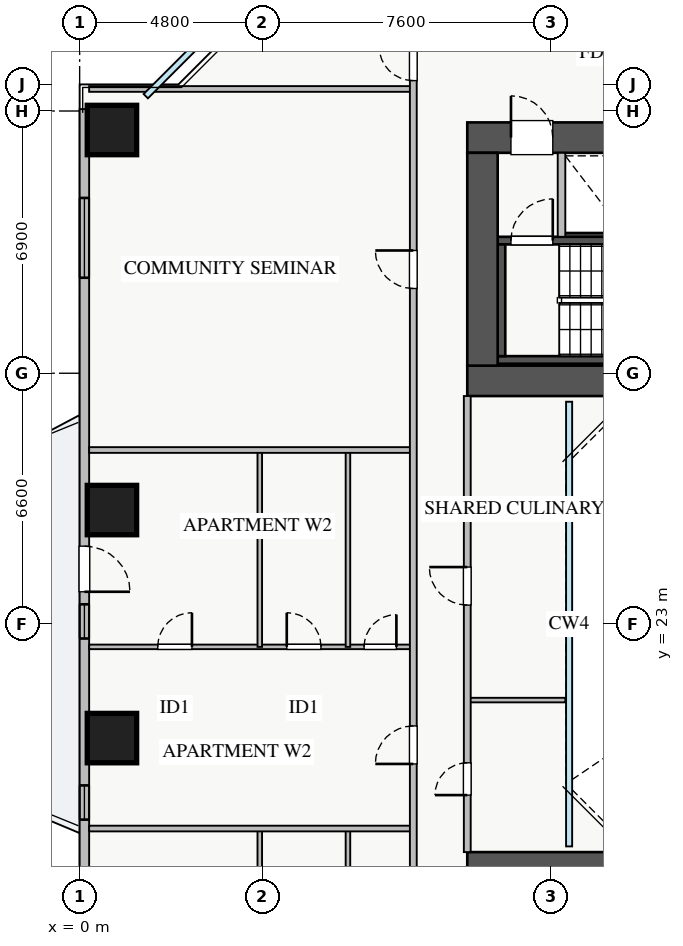
"""IFC4 building model, lengths in metres.
Left out: names, types, materials, properties, quantities, classifications, styles, units other than length and angle.
Written with IfcOpenShell. Run it as: python <this file> out.ifc"""

import sys

from ifc_helpers import new_model, si_unit, direction, frame, frame_2d, origin, origin_2d, place, context, subcontext, project, spatial, rectangle, extrude, source, transform, mapped, element, fill, save


model = new_model("IFC4")
c1 = context("Model", 3, precision=1e-05, world=origin(), true_north=direction((0.0, 1.0)))
c2 = subcontext(c1, "Body", "Model", "MODEL_VIEW")
j1 = project(units=[si_unit("LENGTHUNIT", "METRE"), si_unit("PLANEANGLEUNIT", "RADIAN")], contexts=[c1])
p1 = place(None, origin())
s1 = spatial("IfcSite", under=j1, at=p1, CompositionType="ELEMENT")
p2 = place(p1, origin())
s2 = spatial("IfcBuilding", under=s1, at=p2, CompositionType="ELEMENT")
p3 = place(p2, frame((0.0, 0.0, 76.25)))
s3 = spatial("IfcBuildingStorey", under=s2, at=p3, CompositionType="ELEMENT", Elevation=76.25)
p4 = place(p3, frame((12.68, 33.2, 0.0), z_axis=(0.0, 0.0, 1.0), x_axis=(1.0, 0.0, 0.0)))
e1 = element("IfcWall", 1, at=p4, inside=s3, PredefinedType="SHEAR", context=c2, shape_type="SweptSolid", body=[
    extrude(rectangle(XDim=1.94, YDim=0.18, at=frame_2d((0.97, 0.0))), origin(), (0.0, 0.0, 1.0), 3.07),
])
p5 = place(p3, frame((11.0, 29.95, 0.0), z_axis=(0.0, 0.0, 1.0), x_axis=(1.0, 0.0, 0.0)))
e2 = element("IfcWall", 2, at=p5, inside=s3, PredefinedType="SHEAR", context=c2, shape_type="SweptSolid", body=[
    extrude(rectangle(XDim=7.15, YDim=0.2, at=frame_2d((3.575, 0.0))), origin(), (0.0, 0.0, 1.0), 3.25),
])
p6 = place(p3, frame((11.0, 33.09, 0.0), z_axis=(0.0, 0.0, 1.0), x_axis=(1.0, 0.0, 0.0)))
e3 = element("IfcWall", 3, at=p6, inside=s3, PredefinedType="SHEAR", context=c2, shape_type="SweptSolid", body=[
    extrude(rectangle(XDim=7.15, YDim=0.2, at=frame_2d((3.575, 0.0))), origin(), (0.0, 0.0, 1.0), 3.25),
])
p7 = place(p6, frame((0.35, 0.0, 0.0)))
e4 = element("IfcOpeningElement", 4, at=p7, cuts=e3, PredefinedType="OPENING", context=c2, shape_type="SweptSolid", body=[
    extrude(rectangle(XDim=1.1, YDim=2.05, at=frame_2d((0.55, 1.025))), frame((0.0, 0.11, 0.0), z_axis=(0.0, -1.0, 0.0), x_axis=(1.0, 0.0, 0.0)), (0.0, 0.0, 1.0), 0.22),
])
p8 = place(p3, frame((11.1, 30.05, 0.0), z_axis=(0.0, 0.0, 1.0), x_axis=(0.0, 1.0, 0.0)))
e5 = element("IfcWall", 5, at=p8, inside=s3, PredefinedType="SHEAR", context=c2, shape_type="SweptSolid", body=[
    extrude(rectangle(XDim=2.94, YDim=0.2, at=frame_2d((1.47, 0.0))), origin(), (0.0, 0.0, 1.0), 3.25),
])
p9 = place(p3, frame((10.2, 29.4, 0.0), z_axis=(0.0, 0.0, 1.0), x_axis=(1.0, 0.0, 0.0)))
e6 = element("IfcWall", 6, at=p9, inside=s3, PredefinedType="SHEAR", context=c2, shape_type="SweptSolid", body=[
    extrude(rectangle(XDim=17.6, YDim=0.8, at=frame_2d((8.8, 0.0))), origin(), (0.0, 0.0, 1.0), 3.25),
])
p10 = place(p3, frame((10.2, 35.8, 0.0), z_axis=(0.0, 0.0, 1.0), x_axis=(1.0, 0.0, 0.0)))
e7 = element("IfcWall", 7, at=p10, inside=s3, PredefinedType="SHEAR", context=c2, shape_type="SweptSolid", body=[
    extrude(rectangle(XDim=17.6, YDim=0.8, at=frame_2d((8.8, 0.0))), origin(), (0.0, 0.0, 1.0), 3.25),
])
p11 = place(p10, frame((1.15, 0.0, 0.0)))
e8 = element("IfcOpeningElement", 8, at=p11, cuts=e7, PredefinedType="OPENING", context=c2, shape_type="SweptSolid", body=[
    extrude(rectangle(XDim=1.1, YDim=2.05, at=frame_2d((0.55, 1.025))), frame((0.0, 0.41, 0.0), z_axis=(0.0, -1.0, 0.0), x_axis=(1.0, 0.0, 0.0)), (0.0, 0.0, 1.0), 0.82),
])
p12 = place(p10, frame((8.3, 0.0, 0.0)))
e9 = element("IfcOpeningElement", 9, at=p12, cuts=e7, PredefinedType="OPENING", context=c2, shape_type="SweptSolid", body=[
    extrude(rectangle(XDim=1.1, YDim=2.05, at=frame_2d((0.55, 1.025))), frame((0.0, 0.41, 0.0), z_axis=(0.0, -1.0, 0.0), x_axis=(1.0, 0.0, 0.0)), (0.0, 0.0, 1.0), 0.82),
])
p13 = place(p10, frame((10.05, 0.0, 0.0)))
e10 = element("IfcOpeningElement", 10, at=p13, cuts=e7, PredefinedType="OPENING", context=c2, shape_type="SweptSolid", body=[
    extrude(rectangle(XDim=1.1, YDim=2.05, at=frame_2d((0.55, 1.025))), frame((0.0, 0.41, 0.0), z_axis=(0.0, -1.0, 0.0), x_axis=(1.0, 0.0, 0.0)), (0.0, 0.0, 1.0), 0.82),
])
p14 = place(p10, frame((14.74, 0.0, 0.0)))
e11 = element("IfcOpeningElement", 11, at=p14, cuts=e7, PredefinedType="OPENING", context=c2, shape_type="SweptSolid", body=[
    extrude(rectangle(XDim=1.0, YDim=2.05, at=frame_2d((0.5, 1.025))), frame((0.0, 0.41, 0.0), z_axis=(0.0, -1.0, 0.0), x_axis=(1.0, 0.0, 0.0)), (0.0, 0.0, 1.0), 0.82),
])
p15 = place(p10, frame((12.585, 0.0, 0.0)))
e12 = element("IfcOpeningElement", 12, at=p15, cuts=e7, PredefinedType="OPENING", context=c2, shape_type="SweptSolid", body=[
    extrude(rectangle(XDim=1.0, YDim=2.05, at=frame_2d((0.5, 1.025))), frame((0.0, 0.41, 0.0), z_axis=(0.0, -1.0, 0.0), x_axis=(1.0, 0.0, 0.0)), (0.0, 0.0, 1.0), 0.82),
])
p16 = place(p3, frame((10.6, 29.8, 0.0), z_axis=(0.0, 0.0, 1.0), x_axis=(0.0, 1.0, 0.0)))
e13 = element("IfcWall", 13, at=p16, inside=s3, PredefinedType="SHEAR", context=c2, shape_type="SweptSolid", body=[
    extrude(rectangle(XDim=5.6, YDim=0.8, at=frame_2d((2.8, 0.0))), origin(), (0.0, 0.0, 1.0), 3.25),
])
p17 = place(p3, frame((10.2, 16.6, 0.0), z_axis=(0.0, 0.0, 1.0), x_axis=(1.0, 0.0, 0.0)))
e14 = element("IfcWall", 14, at=p17, inside=s3, PredefinedType="SHEAR", context=c2, shape_type="SweptSolid", body=[
    extrude(rectangle(XDim=17.6, YDim=0.8, at=frame_2d((8.8, 0.0))), origin(), (0.0, 0.0, 1.0), 3.25),
])
m1 = source(origin(), c2, "Body", "SweptSolid", [
    extrude(rectangle(XDim=1.3, YDim=1.3, at=origin_2d()), origin(), (0.0, 0.0, 1.0), 3.25),
])
for number, where, z_axis, x_axis in (
    (15, (0.85, 36.0, 0.0), (0.0, 0.0, 1.0), (1.0, 0.0, 0.0)),
    (16, (0.85, 26.0, 0.0), (0.0, 0.0, 1.0), (1.0, 0.0, 0.0)),
    (17, (0.85, 20.0, 0.0), (0.0, 0.0, 1.0), (1.0, 0.0, 0.0)),
):
    element("IfcColumn", number, at=place(p3, frame(where, z_axis=z_axis, x_axis=x_axis)), inside=s3, PredefinedType="COLUMN", context=c2, shape_type="MappedRepresentation", body=[
        mapped(m1, transform((0.0, 0.0, 0.0), x_axis=(1.0, 0.0, 0.0), y_axis=(0.0, 1.0, 0.0), z_axis=(0.0, 0.0, 1.0), scale=1.0)),
    ])
p18 = place(p3, frame((0.125, 9.45, 0.0), z_axis=(0.0, 0.0, 1.0), x_axis=(0.0, 1.0, 0.0)))
e18 = element("IfcWall", 18, at=p18, inside=s3, PredefinedType="STANDARD", context=c2, shape_type="SweptSolid", body=[
    extrude(rectangle(XDim=27.1, YDim=0.25, at=frame_2d((13.55, 0.0))), origin(), (0.0, 0.0, 1.0), 2.61),
])
p19 = place(p18, frame((14.4, 0.0, 0.0)))
e19 = element("IfcOpeningElement", 19, at=p19, cuts=e18, PredefinedType="OPENING", context=c2, shape_type="SweptSolid", body=[
    extrude(rectangle(XDim=1.2, YDim=2.1, at=frame_2d((0.6, 1.05))), frame((0.0, 0.135, 0.0), z_axis=(0.0, -1.0, 0.0), x_axis=(1.0, 0.0, 0.0)), (0.0, 0.0, 1.0), 0.27),
])
p20 = place(p18, frame((1.403, 0.0, 0.9)))
e20 = element("IfcOpeningElement", 20, at=p20, cuts=e18, PredefinedType="OPENING", context=c2, shape_type="SweptSolid", body=[
    extrude(rectangle(XDim=1.8, YDim=1.5, at=frame_2d((0.9, 0.75))), frame((0.0, 0.135, 0.0), z_axis=(0.0, -1.0, 0.0), x_axis=(1.0, 0.0, 0.0)), (0.0, 0.0, 1.0), 0.27),
])
p21 = place(p18, frame((22.663, 0.0, 0.9)))
e21 = element("IfcOpeningElement", 21, at=p21, cuts=e18, PredefinedType="OPENING", context=c2, shape_type="SweptSolid", body=[
    extrude(rectangle(XDim=2.1, YDim=1.48, at=frame_2d((1.05, 0.74))), frame((0.0, 0.135, 0.0), z_axis=(0.0, -1.0, 0.0), x_axis=(1.0, 0.0, 0.0)), (0.0, 0.0, 1.0), 0.27),
])
p22 = place(p18, frame((4.607, 0.0, 0.9)))
e22 = element("IfcOpeningElement", 22, at=p22, cuts=e18, PredefinedType="OPENING", context=c2, shape_type="SweptSolid", body=[
    extrude(rectangle(XDim=2.4, YDim=1.5, at=frame_2d((1.2, 0.75))), frame((0.0, 0.135, 0.0), z_axis=(0.0, -1.0, 0.0), x_axis=(1.0, 0.0, 0.0)), (0.0, 0.0, 1.0), 0.27),
])
p23 = place(p18, frame((13.17, 0.0, 0.9)))
e23 = element("IfcOpeningElement", 23, at=p23, cuts=e18, PredefinedType="OPENING", context=c2, shape_type="SweptSolid", body=[
    extrude(rectangle(XDim=0.9, YDim=1.2, at=frame_2d((0.45, 0.6))), frame((0.0, 0.135, 0.0), z_axis=(0.0, -1.0, 0.0), x_axis=(1.0, 0.0, 0.0)), (0.0, 0.0, 1.0), 0.27),
])
p24 = place(p18, frame((8.405, 0.0, 0.9)))
e24 = element("IfcOpeningElement", 24, at=p24, cuts=e18, PredefinedType="OPENING", context=c2, shape_type="SweptSolid", body=[
    extrude(rectangle(XDim=0.9, YDim=1.2, at=frame_2d((0.45, 0.6))), frame((0.0, 0.135, 0.0), z_axis=(0.0, -1.0, 0.0), x_axis=(1.0, 0.0, 0.0)), (0.0, 0.0, 1.0), 0.27),
])
p25 = place(p3, frame((12.68, 33.19, 0.0), z_axis=(0.0, 0.0, 1.0), x_axis=(0.0, 1.0, 0.0)))
e25 = element("IfcWall", 25, at=p25, inside=s3, PredefinedType="PARTITIONING", context=c2, shape_type="SweptSolid", body=[
    extrude(rectangle(XDim=2.21, YDim=0.2, at=frame_2d((1.105, 0.0))), origin(), (0.0, 0.0, 1.0), 3.07),
])
p26 = place(p3, frame((0.25, 37.08, 0.0), z_axis=(0.0, 0.0, 1.0), x_axis=(1.0, 0.0, 0.0)))
e26 = element("IfcWall", 26, at=p26, inside=s3, PredefinedType="PARTITIONING", context=c2, shape_type="SweptSolid", body=[
    extrude(rectangle(XDim=8.53, YDim=0.15, at=frame_2d((4.265, 0.0))), origin(), (0.0, 0.0, 1.0), 3.07),
])
for number, where, z_axis, x_axis in (
    (27, (4.74, 12.91, 0.0), (0.0, 0.0, 1.0), (0.0, 1.0, 0.0)),
    (28, (7.06, 12.91, 0.0), (0.0, 0.0, 1.0), (0.0, 1.0, 0.0)),
):
    element("IfcWall", number, at=place(p3, frame(where, z_axis=z_axis, x_axis=x_axis)), inside=s3, PredefinedType="PLUMBINGWALL", context=c2, shape_type="SweptSolid", body=[
        extrude(rectangle(XDim=4.71, YDim=0.12, at=frame_2d((2.355, 0.0))), origin(), (0.0, 0.0, 1.0), 3.07),
    ])
p27 = place(p3, frame((0.25, 22.4, 0.0), z_axis=(0.0, 0.0, 1.0), x_axis=(1.0, 0.0, 0.0)))
e29 = element("IfcWall", 29, at=p27, inside=s3, PredefinedType="PLUMBINGWALL", context=c2, shape_type="SweptSolid", body=[
    extrude(rectangle(XDim=8.53, YDim=0.12, at=frame_2d((4.265, 0.0))), origin(), (0.0, 0.0, 1.0), 3.07),
])
p28 = place(p27, frame((1.805, 0.0, 0.0)))
e30 = element("IfcOpeningElement", 30, at=p28, cuts=e29, PredefinedType="OPENING", context=c2, shape_type="SweptSolid", body=[
    extrude(rectangle(XDim=0.9, YDim=2.05, at=frame_2d((0.45, 1.025))), frame((0.0, 0.07, 0.0), z_axis=(0.0, -1.0, 0.0), x_axis=(1.0, 0.0, 0.0)), (0.0, 0.0, 1.0), 0.14),
])
p29 = place(p27, frame((5.2, 0.0, 0.0)))
e31 = element("IfcOpeningElement", 31, at=p29, cuts=e29, PredefinedType="OPENING", context=c2, shape_type="SweptSolid", body=[
    extrude(rectangle(XDim=0.9, YDim=2.05, at=frame_2d((0.45, 1.025))), frame((0.0, 0.07, 0.0), z_axis=(0.0, -1.0, 0.0), x_axis=(1.0, 0.0, 0.0)), (0.0, 0.0, 1.0), 0.14),
])
p30 = place(p27, frame((7.235, 0.0, 0.0)))
e32 = element("IfcOpeningElement", 32, at=p30, cuts=e29, PredefinedType="OPENING", context=c2, shape_type="SweptSolid", body=[
    extrude(rectangle(XDim=0.85, YDim=2.05, at=frame_2d((0.425, 1.025))), frame((0.0, 0.07, 0.0), z_axis=(0.0, -1.0, 0.0), x_axis=(1.0, 0.0, 0.0)), (0.0, 0.0, 1.0), 0.14),
])
for number, where, z_axis, x_axis in (
    (33, (4.74, 22.4, 0.0), (0.0, 0.0, 1.0), (0.0, 1.0, 0.0)),
    (34, (7.06, 22.4, 0.0), (0.0, 0.0, 1.0), (0.0, 1.0, 0.0)),
):
    element("IfcWall", number, at=place(p3, frame(where, z_axis=z_axis, x_axis=x_axis)), inside=s3, PredefinedType="PLUMBINGWALL", context=c2, shape_type="SweptSolid", body=[
        extrude(rectangle(XDim=5.18, YDim=0.12, at=frame_2d((2.59, 0.0))), origin(), (0.0, 0.0, 1.0), 3.07),
    ])
p31 = place(p3, frame((0.25, 17.62, 0.0), z_axis=(0.0, 0.0, 1.0), x_axis=(1.0, 0.0, 0.0)))
e35 = element("IfcWall", 35, at=p31, inside=s3, PredefinedType="PARTITIONING", context=c2, shape_type="SweptSolid", body=[
    extrude(rectangle(XDim=8.53, YDim=0.15, at=frame_2d((4.265, 0.0))), origin(), (0.0, 0.0, 1.0), 3.07),
])
p32 = place(p3, frame((0.25, 27.58, 0.0), z_axis=(0.0, 0.0, 1.0), x_axis=(1.0, 0.0, 0.0)))
e36 = element("IfcWall", 36, at=p32, inside=s3, PredefinedType="PARTITIONING", context=c2, shape_type="SweptSolid", body=[
    extrude(rectangle(XDim=8.53, YDim=0.15, at=frame_2d((4.265, 0.0))), origin(), (0.0, 0.0, 1.0), 2.715),
])
p33 = place(p3, frame((8.78, 7.21, 0.0), z_axis=(0.0, 0.0, 1.0), x_axis=(0.0, 1.0, 0.0)))
e37 = element("IfcWall", 37, at=p33, inside=s3, PredefinedType="PARTITIONING", context=c2, shape_type="SweptSolid", body=[
    extrude(rectangle(XDim=31.23, YDim=0.18, at=frame_2d((15.615, 0.0))), origin(), (0.0, 0.0, 1.0), 3.07),
])
p34 = place(p33, frame((30.09, 0.0, 0.0)))
e38 = element("IfcOpeningElement", 38, at=p34, cuts=e37, PredefinedType="OPENING", context=c2, shape_type="SweptSolid", body=[
    extrude(rectangle(XDim=0.9, YDim=2.05, at=frame_2d((0.45, 1.025))), frame((0.0, 0.1, 0.0), z_axis=(0.0, -1.0, 0.0), x_axis=(1.0, 0.0, 0.0)), (0.0, 0.0, 1.0), 0.2),
])
p35 = place(p33, frame((0.24, 0.0, 0.0)))
e39 = element("IfcOpeningElement", 39, at=p35, cuts=e37, PredefinedType="OPENING", context=c2, shape_type="SweptSolid", body=[
    extrude(rectangle(XDim=0.9, YDim=2.05, at=frame_2d((0.45, 1.025))), frame((0.0, 0.1, 0.0), z_axis=(0.0, -1.0, 0.0), x_axis=(1.0, 0.0, 0.0)), (0.0, 0.0, 1.0), 0.2),
])
p36 = place(p33, frame((2.84, 0.0, 0.0)))
e40 = element("IfcOpeningElement", 40, at=p36, cuts=e37, PredefinedType="OPENING", context=c2, shape_type="SweptSolid", body=[
    extrude(rectangle(XDim=1.0, YDim=2.05, at=frame_2d((0.5, 1.025))), frame((0.0, 0.1, 0.0), z_axis=(0.0, -1.0, 0.0), x_axis=(1.0, 0.0, 0.0)), (0.0, 0.0, 1.0), 0.2),
])
p37 = place(p33, frame((12.11, 0.0, 0.0)))
e41 = element("IfcOpeningElement", 41, at=p37, cuts=e37, PredefinedType="OPENING", context=c2, shape_type="SweptSolid", body=[
    extrude(rectangle(XDim=1.0, YDim=2.05, at=frame_2d((0.5, 1.025))), frame((0.0, 0.1, 0.0), z_axis=(0.0, -1.0, 0.0), x_axis=(1.0, 0.0, 0.0)), (0.0, 0.0, 1.0), 0.2),
])
p38 = place(p33, frame((24.62, 0.0, 0.0)))
e42 = element("IfcOpeningElement", 42, at=p38, cuts=e37, PredefinedType="OPENING", context=c2, shape_type="SweptSolid", body=[
    extrude(rectangle(XDim=1.0, YDim=2.05, at=frame_2d((0.5, 1.025))), frame((0.0, 0.1, 0.0), z_axis=(0.0, -1.0, 0.0), x_axis=(1.0, 0.0, 0.0)), (0.0, 0.0, 1.0), 0.2),
])
p39 = place(p3, frame((10.2, 21.0, 0.0), z_axis=(0.0, 0.0, 1.0), x_axis=(1.0, 0.0, 0.0)))
e43 = element("IfcWall", 43, at=p39, inside=s3, PredefinedType="PLUMBINGWALL", context=c2, shape_type="SweptSolid", body=[
    extrude(rectangle(XDim=2.58, YDim=0.12, at=frame_2d((1.29, 0.0))), origin(), (0.0, 0.0, 1.0), 3.07),
])
p40 = place(p3, frame((10.2, 17.0, 0.0), z_axis=(0.0, 0.0, 1.0), x_axis=(0.0, 1.0, 0.0)))
e44 = element("IfcWall", 44, at=p40, inside=s3, PredefinedType="PARTITIONING", context=c2, shape_type="SweptSolid", body=[
    extrude(rectangle(XDim=12.0, YDim=0.18, at=frame_2d((6.0, 0.0))), origin(), (0.0, 0.0, 1.0), 3.07),
])
p41 = place(p40, frame((1.5, 0.0, 0.0)))
e45 = element("IfcOpeningElement", 45, at=p41, cuts=e44, PredefinedType="OPENING", context=c2, shape_type="SweptSolid", body=[
    extrude(rectangle(XDim=0.85, YDim=2.05, at=frame_2d((0.425, 1.025))), frame((0.0, 0.1, 0.0), z_axis=(0.0, -1.0, 0.0), x_axis=(1.0, 0.0, 0.0)), (0.0, 0.0, 1.0), 0.2),
])
p42 = place(p40, frame((6.5, 0.0, 0.0)))
e46 = element("IfcOpeningElement", 46, at=p42, cuts=e44, PredefinedType="OPENING", context=c2, shape_type="SweptSolid", body=[
    extrude(rectangle(XDim=1.0, YDim=2.05, at=frame_2d((0.5, 1.025))), frame((0.0, 0.1, 0.0), z_axis=(0.0, -1.0, 0.0), x_axis=(1.0, 0.0, 0.0)), (0.0, 0.0, 1.0), 0.2),
])
m2 = source(origin(), c2, "Body", "SweptSolid", [
    extrude(rectangle(XDim=1.2, YDim=2.1, at=frame_2d((0.6, 1.05))), frame((0.0, 0.025, 0.0), z_axis=(0.0, -1.0, 0.0), x_axis=(1.0, 0.0, 0.0)), (0.0, 0.0, 1.0), 0.05),
])
p43 = place(p19, frame((1.2, 0.0, 0.0), z_axis=(0.0, 0.0, 1.0), x_axis=(-1.0, 0.0, 0.0)))
e47 = element("IfcDoor", 47, at=p43, inside=s3, OperationType="SINGLE_SWING_LEFT", PredefinedType="DOOR", context=c2, shape_type="MappedRepresentation", body=[
    mapped(m2, transform((0.0, 0.0, 0.0), x_axis=(1.0, 0.0, 0.0), y_axis=(0.0, 1.0, 0.0), z_axis=(0.0, 0.0, 1.0), scale=1.0)),
])
fill(e19, e47)
m3 = source(origin(), c2, "Body", "SweptSolid", [
    extrude(rectangle(XDim=2.1, YDim=1.48, at=frame_2d((1.05, 0.74))), frame((0.0, 0.03, 0.0), z_axis=(0.0, -1.0, 0.0), x_axis=(1.0, 0.0, 0.0)), (0.0, 0.0, 1.0), 0.06),
])
p44 = place(p21, origin())
e48 = element("IfcWindow", 48, at=p44, inside=s3, PartitioningType="TRIPLE_PANEL_VERTICAL", PredefinedType="WINDOW", context=c2, shape_type="MappedRepresentation", body=[
    mapped(m3, transform((0.0, 0.0, 0.0), x_axis=(1.0, 0.0, 0.0), y_axis=(0.0, 1.0, 0.0), z_axis=(0.0, 0.0, 1.0), scale=1.0)),
])
fill(e21, e48)
m4 = source(origin(), c2, "Body", "SweptSolid", [
    extrude(rectangle(XDim=1.1, YDim=2.05, at=frame_2d((0.55, 1.025))), frame((0.0, 0.025, 0.0), z_axis=(0.0, -1.0, 0.0), x_axis=(1.0, 0.0, 0.0)), (0.0, 0.0, 1.0), 0.05),
])
p45 = place(p11, origin())
e49 = element("IfcDoor", 49, at=p45, inside=s3, OperationType="SINGLE_SWING_LEFT", PredefinedType="DOOR", context=c2, shape_type="MappedRepresentation", body=[
    mapped(m4, transform((0.0, 0.0, 0.0), x_axis=(1.0, 0.0, 0.0), y_axis=(0.0, 1.0, 0.0), z_axis=(0.0, 0.0, 1.0), scale=1.0)),
])
fill(e8, e49)
p46 = place(p7, origin())
e50 = element("IfcDoor", 50, at=p46, inside=s3, OperationType="SINGLE_SWING_RIGHT", PredefinedType="DOOR", context=c2, shape_type="MappedRepresentation", body=[
    mapped(m4, transform((0.0, 0.0, 0.0), x_axis=(1.0, 0.0, 0.0), y_axis=(0.0, 1.0, 0.0), z_axis=(0.0, 0.0, 1.0), scale=1.0)),
])
fill(e4, e50)
m5 = source(origin(), c2, "Body", "SweptSolid", [
    extrude(rectangle(XDim=0.9, YDim=2.05, at=frame_2d((0.45, 1.025))), frame((0.0, 0.025, 0.0), z_axis=(0.0, -1.0, 0.0), x_axis=(1.0, 0.0, 0.0)), (0.0, 0.0, 1.0), 0.05),
])
p47 = place(p28, origin())
e51 = element("IfcDoor", 51, at=p47, inside=s3, OperationType="SINGLE_SWING_RIGHT", PredefinedType="DOOR", context=c2, shape_type="MappedRepresentation", body=[
    mapped(m5, transform((0.0, 0.0, 0.0), x_axis=(1.0, 0.0, 0.0), y_axis=(0.0, 1.0, 0.0), z_axis=(0.0, 0.0, 1.0), scale=1.0)),
])
fill(e30, e51)
p48 = place(p29, origin())
e52 = element("IfcDoor", 52, at=p48, inside=s3, OperationType="SINGLE_SWING_LEFT", PredefinedType="DOOR", context=c2, shape_type="MappedRepresentation", body=[
    mapped(m5, transform((0.0, 0.0, 0.0), x_axis=(1.0, 0.0, 0.0), y_axis=(0.0, 1.0, 0.0), z_axis=(0.0, 0.0, 1.0), scale=1.0)),
])
fill(e31, e52)
m6 = source(origin(), c2, "Body", "SweptSolid", [
    extrude(rectangle(XDim=0.85, YDim=2.05, at=frame_2d((0.425, 1.025))), frame((0.0, 0.025, 0.0), z_axis=(0.0, -1.0, 0.0), x_axis=(1.0, 0.0, 0.0)), (0.0, 0.0, 1.0), 0.05),
])
p49 = place(p30, origin())
e53 = element("IfcDoor", 53, at=p49, inside=s3, OperationType="SINGLE_SWING_RIGHT", PredefinedType="DOOR", context=c2, shape_type="MappedRepresentation", body=[
    mapped(m6, transform((0.0, 0.0, 0.0), x_axis=(1.0, 0.0, 0.0), y_axis=(0.0, 1.0, 0.0), z_axis=(0.0, 0.0, 1.0), scale=1.0)),
])
fill(e32, e53)
p50 = place(p34, origin())
e54 = element("IfcDoor", 54, at=p50, inside=s3, OperationType="SINGLE_SWING_RIGHT", PredefinedType="DOOR", context=c2, shape_type="MappedRepresentation", body=[
    mapped(m5, transform((0.0, 0.0, 0.0), x_axis=(1.0, 0.0, 0.0), y_axis=(0.0, 1.0, 0.0), z_axis=(0.0, 0.0, 1.0), scale=1.0)),
])
fill(e38, e54)
m7 = source(origin(), c2, "Body", "SweptSolid", [
    extrude(rectangle(XDim=1.0, YDim=2.05, at=frame_2d((0.5, 1.025))), frame((0.0, 0.025, 0.0), z_axis=(0.0, -1.0, 0.0), x_axis=(1.0, 0.0, 0.0)), (0.0, 0.0, 1.0), 0.05),
])
p51 = place(p37, origin())
e55 = element("IfcDoor", 55, at=p51, inside=s3, OperationType="SINGLE_SWING_LEFT", PredefinedType="DOOR", context=c2, shape_type="MappedRepresentation", body=[
    mapped(m7, transform((0.0, 0.0, 0.0), x_axis=(1.0, 0.0, 0.0), y_axis=(0.0, 1.0, 0.0), z_axis=(0.0, 0.0, 1.0), scale=1.0)),
])
fill(e41, e55)
p52 = place(p38, origin())
e56 = element("IfcDoor", 56, at=p52, inside=s3, OperationType="SINGLE_SWING_RIGHT", PredefinedType="DOOR", context=c2, shape_type="MappedRepresentation", body=[
    mapped(m7, transform((0.0, 0.0, 0.0), x_axis=(1.0, 0.0, 0.0), y_axis=(0.0, 1.0, 0.0), z_axis=(0.0, 0.0, 1.0), scale=1.0)),
])
fill(e42, e56)
p53 = place(p41, origin())
e57 = element("IfcDoor", 57, at=p53, inside=s3, OperationType="SINGLE_SWING_LEFT", PredefinedType="DOOR", context=c2, shape_type="MappedRepresentation", body=[
    mapped(m6, transform((0.0, 0.0, 0.0), x_axis=(1.0, 0.0, 0.0), y_axis=(0.0, 1.0, 0.0), z_axis=(0.0, 0.0, 1.0), scale=1.0)),
])
fill(e45, e57)
p54 = place(p42, origin())
e58 = element("IfcDoor", 58, at=p54, inside=s3, OperationType="SINGLE_SWING_RIGHT", PredefinedType="DOOR", context=c2, shape_type="MappedRepresentation", body=[
    mapped(m7, transform((0.0, 0.0, 0.0), x_axis=(1.0, 0.0, 0.0), y_axis=(0.0, 1.0, 0.0), z_axis=(0.0, 0.0, 1.0), scale=1.0)),
])
fill(e46, e58)
m8 = source(origin(), c2, "Body", "SweptSolid", [
    extrude(rectangle(XDim=0.9, YDim=1.2, at=frame_2d((0.45, 0.6))), frame((0.0, 0.03, 0.0), z_axis=(0.0, -1.0, 0.0), x_axis=(1.0, 0.0, 0.0)), (0.0, 0.0, 1.0), 0.06),
])
p55 = place(p23, origin())
e59 = element("IfcWindow", 59, at=p55, inside=s3, PartitioningType="SINGLE_PANEL", PredefinedType="WINDOW", context=c2, shape_type="MappedRepresentation", body=[
    mapped(m8, transform((0.0, 0.0, 0.0), x_axis=(1.0, 0.0, 0.0), y_axis=(0.0, 1.0, 0.0), z_axis=(0.0, 0.0, 1.0), scale=1.0)),
])
fill(e23, e59)
p56 = place(p24, origin())
e60 = element("IfcWindow", 60, at=p56, inside=s3, PartitioningType="SINGLE_PANEL", PredefinedType="WINDOW", context=c2, shape_type="MappedRepresentation", body=[
    mapped(m8, transform((0.0, 0.0, 0.0), x_axis=(1.0, 0.0, 0.0), y_axis=(0.0, 1.0, 0.0), z_axis=(0.0, 0.0, 1.0), scale=1.0)),
])
fill(e24, e60)
save(model, sys.argv[1])
